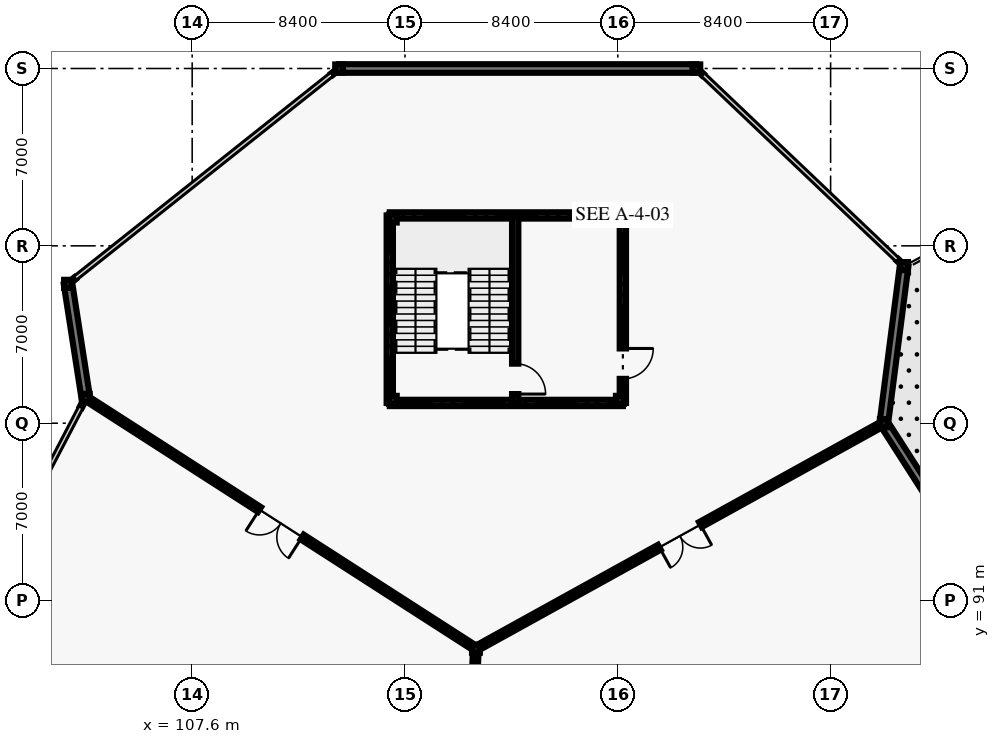
"""IFC4 building model, lengths in metres.
Left out: names, types, materials, properties, quantities, classifications, styles, units other than length and angle.
Written with IfcOpenShell. Run it as: python <this file> out.ifc"""

import sys

from ifc_helpers import new_model, si_unit, direction, frame, frame_2d, origin, origin_2d, place, context, subcontext, project, spatial, rectangle, i_section, extrude, element, fill, save


model = new_model("IFC4")
c1 = context("Model", 3, precision=1e-05, world=origin(), true_north=direction((0.0, 1.0)))
c2 = subcontext(c1, "Body", "Model", "MODEL_VIEW")
j1 = project(units=[si_unit("LENGTHUNIT", "METRE"), si_unit("PLANEANGLEUNIT", "RADIAN")], contexts=[c1])
p1 = place(None, origin())
s1 = spatial("IfcSite", under=j1, at=p1, CompositionType="ELEMENT")
p2 = place(p1, origin())
s2 = spatial("IfcBuilding", under=s1, at=p2, CompositionType="ELEMENT")
p3 = place(p2, frame((0.0, 0.0, 15.0)))
s3 = spatial("IfcBuildingStorey", under=s2, at=p3, CompositionType="ELEMENT", Elevation=15.0)
for number, where, z_axis, x_axis in (
    (1, (102.7, 103.5, 0.0), (0.0, 0.0, 1.0), (1.0, 0.0, 0.0)),
    (2, (103.4, 99.0, 0.0), (0.0, 0.0, 1.0), (1.0, 0.0, 0.0)),
    (3, (113.4, 112.0, 0.0), (0.0, 0.0, 1.0), (1.0, 0.0, 0.0)),
    (4, (118.8, 89.1, 0.0), (0.0, 0.0, 1.0), (1.0, 0.0, 0.0)),
    (5, (127.5, 112.0, 0.0), (0.0, 0.0, 1.0), (1.0, 0.0, 0.0)),
    (6, (134.9, 98.0, 0.0), (0.0, 0.0, 1.0), (1.0, 0.0, 0.0)),
    (7, (135.7, 104.2, 0.0), (0.0, 0.0, 1.0), (1.0, 0.0, 0.0)),
    (8, (115.52, 98.92, 0.0), (0.0, 0.0, 1.0), (1.0, 0.0, 0.0)),
    (9, (124.48, 98.92, 0.0), (0.0, 0.0, 1.0), (1.0, 0.0, 0.0)),
    (10, (124.48, 106.08, 0.0), (0.0, 0.0, 1.0), (1.0, 0.0, 0.0)),
    (11, (115.52, 106.08, 0.0), (0.0, 0.0, 1.0), (1.0, 0.0, 0.0)),
):
    element("IfcColumn", number, at=place(p3, frame(where, z_axis=z_axis, x_axis=x_axis)), inside=s3, PredefinedType="COLUMN", context=c2, shape_type="SweptSolid", body=[
        extrude(i_section(OverallWidth=0.309, OverallDepth=0.321, WebThickness=0.014, FlangeThickness=0.022, FilletRadius=0.017, at=origin_2d()), origin(), (0.0, 0.0, 1.0), 4.8),
    ])
p4 = place(p3, frame((103.21, 98.637, 0.0), z_axis=(0.0, 0.0, 1.0), x_axis=(0.464243799771, 0.885707454171, 0.0)))
e12 = element("IfcWall", 12, at=p4, inside=s3, PredefinedType="SOLIDWALL", context=c2, shape_type="SweptSolid", body=[
    extrude(rectangle(XDim=0.308, YDim=0.095, at=frame_2d((0.154, 0.0))), origin(), (0.0, 0.0, 1.0), 3.62),
])
p5 = place(p3, frame((134.932, 97.95, 0.0), z_axis=(0.0, 0.0, 1.0), x_axis=(0.539438422375, -0.84202505216, 0.0)))
e13 = element("IfcWall", 13, at=p5, inside=s3, PredefinedType="SOLIDWALL", context=c2, shape_type="SweptSolid", body=[
    extrude(rectangle(XDim=15.142, YDim=0.34, at=frame_2d((7.571, 0.0))), origin(), (0.0, 0.0, 1.0), 3.62),
])
p6 = place(p5, frame((6.596, 0.0, 0.0)))
e14 = element("IfcOpeningElement", 14, at=p6, cuts=e13, PredefinedType="OPENING", context=c2, shape_type="SweptSolid", body=[
    extrude(rectangle(XDim=1.95, YDim=2.3, at=frame_2d((0.975, 1.15))), frame((0.0, 0.18, 0.0), z_axis=(0.0, -1.0, 0.0), x_axis=(1.0, 0.0, 0.0)), (0.0, 0.0, 1.0), 0.36),
])
p7 = place(p3, frame((135.7, 104.2, 0.0), z_axis=(0.0, 0.0, 1.0), x_axis=(-0.127911284164, -0.99178561362, 0.0)))
e15 = element("IfcWall", 15, at=p7, inside=s3, PredefinedType="SOLIDWALL", context=c2, shape_type="SweptSolid", body=[
    extrude(rectangle(XDim=6.192, YDim=0.34, at=frame_2d((3.096, 0.0))), origin(), (0.0, 0.0, 1.0), 3.62),
])
for number, where, z_axis, x_axis in (
    (16, (127.53, 111.971, 0.0), (0.0, 0.0, 1.0), (0.726, -0.687, 0.0)),
    (17, (135.446, 104.441, 0.0), (0.0, 0.0, 1.0), (0.726, -0.687, 0.0)),
):
    element("IfcWall", number, at=place(p3, frame(where, z_axis=z_axis, x_axis=x_axis)), inside=s3, PredefinedType="SOLIDWALL", context=c2, shape_type="SweptSolid", body=[
        extrude(rectangle(XDim=0.308, YDim=0.095, at=frame_2d((0.154, 0.0))), origin(), (0.0, 0.0, 1.0), 3.62),
    ])
p8 = place(p3, frame((113.4, 112.0, 0.0), z_axis=(0.0, 0.0, 1.0), x_axis=(1.0, 0.0, 0.0)))
e18 = element("IfcWall", 18, at=p8, inside=s3, PredefinedType="SOLIDWALL", context=c2, shape_type="SweptSolid", body=[
    extrude(rectangle(XDim=14.1, YDim=0.34, at=frame_2d((7.05, 0.0))), origin(), (0.0, 0.0, 1.0), 3.62),
])
p9 = place(p3, frame((102.733, 103.526, 0.0), z_axis=(0.0, 0.0, 1.0), x_axis=(0.782180115256, 0.623052379257, 0.0)))
e19 = element("IfcWall", 19, at=p9, inside=s3, PredefinedType="SOLIDWALL", context=c2, shape_type="SweptSolid", body=[
    extrude(rectangle(XDim=0.308, YDim=0.095, at=frame_2d((0.154, 0.0))), origin(), (0.0, 0.0, 1.0), 3.62),
])
p10 = place(p3, frame((113.126, 111.782, 0.0), z_axis=(0.0, 0.0, 1.0), x_axis=(0.781872503851, 0.6234383592, 0.0)))
e20 = element("IfcWall", 20, at=p10, inside=s3, PredefinedType="SOLIDWALL", context=c2, shape_type="SweptSolid", body=[
    extrude(rectangle(XDim=0.308, YDim=0.095, at=frame_2d((0.154, 0.0))), origin(), (0.0, 0.0, 1.0), 3.62),
])
p11 = place(p3, frame((103.391, 99.059, 0.0), z_axis=(0.0, 0.0, 1.0), x_axis=(-0.153783616147, 0.988104548823, 0.0)))
e21 = element("IfcWall", 21, at=p11, inside=s3, PredefinedType="SOLIDWALL", context=c2, shape_type="SweptSolid", body=[
    extrude(rectangle(XDim=4.494, YDim=0.34, at=frame_2d((2.247, 0.0))), origin(), (0.0, 0.0, 1.0), 3.62),
])
p12 = place(p3, frame((117.9, 70.6, 0.0), z_axis=(0.0, 0.0, 1.0), x_axis=(0.048599072515, 0.998818366947, 0.0)))
e22 = element("IfcWall", 22, at=p12, inside=s3, PredefinedType="SOLIDWALL", context=c2, shape_type="SweptSolid", body=[
    extrude(rectangle(XDim=18.522, YDim=0.225, at=frame_2d((9.261, 0.0))), origin(), (0.0, 0.0, 1.0), 4.02),
])
p13 = place(p12, frame((8.161, 0.0, 0.0)))
e23 = element("IfcOpeningElement", 23, at=p13, cuts=e22, PredefinedType="OPENING", context=c2, shape_type="SweptSolid", body=[
    extrude(rectangle(XDim=2.2, YDim=2.6, at=frame_2d((1.1, 1.3))), frame((0.0, 0.123, 0.0), z_axis=(0.0, -1.0, 0.0), x_axis=(1.0, 0.0, 0.0)), (0.0, 0.0, 1.0), 0.245),
])
p14 = place(p3, frame((118.8, 89.1, 0.0), z_axis=(0.0, 0.0, 1.0), x_axis=(-0.841183241423, 0.540750177392, 0.0)))
e24 = element("IfcWall", 24, at=p14, inside=s3, PredefinedType="SOLIDWALL", context=c2, shape_type="SweptSolid", body=[
    extrude(rectangle(XDim=18.308, YDim=0.225, at=frame_2d((9.154, 0.0))), origin(), (0.0, 0.0, 1.0), 4.02),
])
p15 = place(p14, frame((8.154, 0.0, 0.0)))
e25 = element("IfcOpeningElement", 25, at=p15, cuts=e24, PredefinedType="OPENING", context=c2, shape_type="SweptSolid", body=[
    extrude(rectangle(XDim=2.0, YDim=2.5, at=frame_2d((1.0, 1.25))), frame((0.0, 0.123, 0.0), z_axis=(0.0, -1.0, 0.0), x_axis=(1.0, 0.0, 0.0)), (0.0, 0.0, 1.0), 0.245),
])
p16 = place(p3, frame((134.9, 98.0, 0.0), z_axis=(0.0, 0.0, 1.0), x_axis=(-0.875181353329, -0.483794996652, 0.0)))
e26 = element("IfcWall", 26, at=p16, inside=s3, PredefinedType="SOLIDWALL", context=c2, shape_type="SweptSolid", body=[
    extrude(rectangle(XDim=18.396, YDim=0.225, at=frame_2d((9.198, 0.0))), origin(), (0.0, 0.0, 1.0), 4.02),
])
p17 = place(p16, frame((8.273, 0.0, 0.0)))
e27 = element("IfcOpeningElement", 27, at=p17, cuts=e26, PredefinedType="OPENING", context=c2, shape_type="SweptSolid", body=[
    extrude(rectangle(XDim=1.85, YDim=2.4, at=frame_2d((0.925, 1.2))), frame((0.0, 0.123, 0.0), z_axis=(0.0, -1.0, 0.0), x_axis=(1.0, 0.0, 0.0)), (0.0, 0.0, 1.0), 0.245),
])
p18 = place(p3, frame((115.4, 98.8, 0.0), z_axis=(0.0, 0.0, 1.0), x_axis=(0.0, 1.0, 0.0)))
e28 = element("IfcWall", 28, at=p18, inside=s3, PredefinedType="SHEAR", context=c2, shape_type="SweptSolid", body=[
    extrude(rectangle(XDim=7.4, YDim=0.25, at=frame_2d((3.7, 0.0))), origin(), (0.0, 0.0, 1.0), 4.56),
])
for number, where, z_axis, x_axis in (
    (29, (115.4, 106.2, 0.0), (0.0, 0.0, 1.0), (1.0, 0.0, 0.0)),
    (30, (124.6, 98.8, 0.0), (0.0, 0.0, 1.0), (-1.0, 0.0, 0.0)),
):
    element("IfcWall", number, at=place(p3, frame(where, z_axis=z_axis, x_axis=x_axis)), inside=s3, PredefinedType="SHEAR", context=c2, shape_type="SweptSolid", body=[
        extrude(rectangle(XDim=9.2, YDim=0.25, at=frame_2d((4.6, 0.0))), origin(), (0.0, 0.0, 1.0), 4.56),
    ])
p19 = place(p3, frame((124.6, 106.2, 0.0), z_axis=(0.0, 0.0, 1.0), x_axis=(0.0, -1.0, 0.0)))
e31 = element("IfcWall", 31, at=p19, inside=s3, PredefinedType="SHEAR", context=c2, shape_type="SweptSolid", body=[
    extrude(rectangle(XDim=7.4, YDim=0.25, at=frame_2d((3.7, 0.0))), origin(), (0.0, 0.0, 1.0), 4.56),
])
p20 = place(p19, frame((5.25, 0.0, 0.0)))
e32 = element("IfcOpeningElement", 32, at=p20, cuts=e31, PredefinedType="OPENING", context=c2, shape_type="SweptSolid", body=[
    extrude(rectangle(XDim=1.2, YDim=2.2, at=frame_2d((0.6, 1.1))), frame((0.0, 0.135, 0.0), z_axis=(0.0, -1.0, 0.0), x_axis=(1.0, 0.0, 0.0)), (0.0, 0.0, 1.0), 0.27),
])
p21 = place(p3, frame((120.35, 106.2, 0.0), z_axis=(0.0, 0.0, 1.0), x_axis=(0.0, -1.0, 0.0)))
e33 = element("IfcWall", 33, at=p21, inside=s3, PredefinedType="SHEAR", context=c2, shape_type="SweptSolid", body=[
    extrude(rectangle(XDim=7.4, YDim=0.25, at=frame_2d((3.7, 0.0))), origin(), (0.0, 0.0, 1.0), 4.56),
])
p22 = place(p21, frame((5.85, 0.0, 0.0)))
e34 = element("IfcOpeningElement", 34, at=p22, cuts=e33, PredefinedType="OPENING", context=c2, shape_type="SweptSolid", body=[
    extrude(rectangle(XDim=1.2, YDim=2.2, at=frame_2d((0.6, 1.1))), frame((0.0, 0.135, 0.0), z_axis=(0.0, -1.0, 0.0), x_axis=(1.0, 0.0, 0.0)), (0.0, 0.0, 1.0), 0.27),
])
p23 = place(p15, origin())
e35 = element("IfcDoor", 35, at=p23, inside=s3, OperationType="DOUBLE_DOOR_SINGLE_SWING", PredefinedType="DOOR", context=c2, shape_type="SweptSolid", body=[
    extrude(rectangle(XDim=2.0, YDim=2.5, at=frame_2d((1.0, 1.25))), frame((0.0, 0.025, 0.0), z_axis=(0.0, -1.0, 0.0), x_axis=(1.0, 0.0, 0.0)), (0.0, 0.0, 1.0), 0.05),
])
fill(e25, e35)
p24 = place(p17, origin())
e36 = element("IfcDoor", 36, at=p24, inside=s3, OperationType="DOUBLE_DOOR_SINGLE_SWING", PredefinedType="DOOR", context=c2, shape_type="SweptSolid", body=[
    extrude(rectangle(XDim=1.85, YDim=2.4, at=frame_2d((0.925, 1.2))), frame((0.0, 0.025, 0.0), z_axis=(0.0, -1.0, 0.0), x_axis=(1.0, 0.0, 0.0)), (0.0, 0.0, 1.0), 0.05),
])
fill(e27, e36)
p25 = place(p20, origin())
e37 = element("IfcDoor", 37, at=p25, inside=s3, OperationType="SINGLE_SWING_LEFT", PredefinedType="DOOR", context=c2, shape_type="SweptSolid", body=[
    extrude(rectangle(XDim=1.2, YDim=2.2, at=frame_2d((0.6, 1.1))), frame((0.0, 0.025, 0.0), z_axis=(0.0, -1.0, 0.0), x_axis=(1.0, 0.0, 0.0)), (0.0, 0.0, 1.0), 0.05),
])
fill(e32, e37)
p26 = place(p22, origin())
e38 = element("IfcDoor", 38, at=p26, inside=s3, OperationType="SINGLE_SWING_RIGHT", PredefinedType="DOOR", context=c2, shape_type="SweptSolid", body=[
    extrude(rectangle(XDim=1.2, YDim=2.2, at=frame_2d((0.6, 1.1))), frame((0.0, 0.025, 0.0), z_axis=(0.0, -1.0, 0.0), x_axis=(1.0, 0.0, 0.0)), (0.0, 0.0, 1.0), 0.05),
])
fill(e34, e38)
save(model, sys.argv[1])
